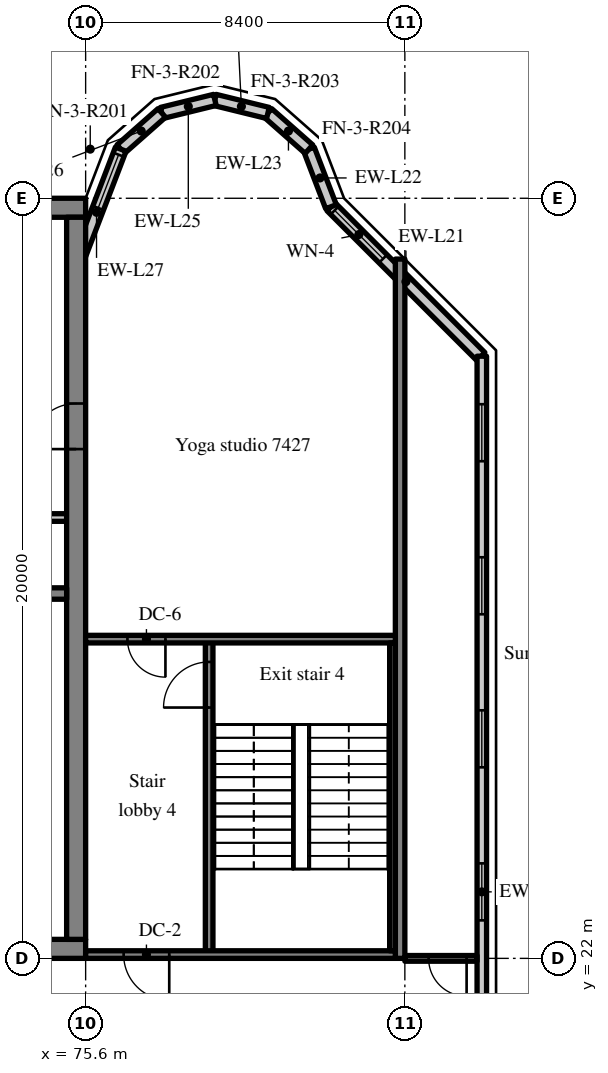
"""IFC4 building model, lengths in metres.
Left out: names, types, materials, properties, quantities, classifications, styles, units other than length and angle.
Written with IfcOpenShell. Run it as: python <this file> out.ifc"""

import sys

from ifc_helpers import new_model, si_unit, direction, frame, frame_2d, origin, place, context, subcontext, project, spatial, rectangle, extrude, source, transform, mapped, element, fill, save


model = new_model("IFC4")
c1 = context("Model", 3, precision=1e-05, world=origin(), true_north=direction((0.0, 1.0)))
c2 = subcontext(c1, "Body", "Model", "MODEL_VIEW")
j1 = project(units=[si_unit("LENGTHUNIT", "METRE"), si_unit("PLANEANGLEUNIT", "RADIAN")], contexts=[c1])
p1 = place(None, origin())
s1 = spatial("IfcSite", under=j1, at=p1, CompositionType="ELEMENT")
p2 = place(p1, origin())
s2 = spatial("IfcBuilding", under=s1, at=p2, CompositionType="ELEMENT")
p3 = place(p2, frame((0.0, 0.0, 309.7)))
s3 = spatial("IfcBuildingStorey", under=s2, at=p3, CompositionType="ELEMENT", Elevation=309.7)
m1 = source(origin(), c2, "Body", "SweptSolid", [
    extrude(rectangle(XDim=50.4, YDim=0.5, at=frame_2d((25.2, 0.0))), origin(), (0.0, 0.0, 1.0), 3.72),
])
p4 = place(p3, frame((25.2, 22.25, 0.0), z_axis=(0.0, 0.0, 1.0), x_axis=(1.0, 0.0, 0.0)))
e1 = element("IfcWall", 1, at=p4, inside=s3, PredefinedType="SHEAR", context=c2, shape_type="MappedRepresentation", body=[
    mapped(m1, transform((0.0, 0.0, 0.0), scale=1.0)),
])
m2 = source(origin(), c2, "Body", "SweptSolid", [
    extrude(rectangle(XDim=1.8, YDim=2.1, at=frame_2d((0.9, 1.05))), frame((0.0, 0.26, 0.0), z_axis=(0.0, -1.0, 0.0), x_axis=(1.0, 0.0, 0.0)), (0.0, 0.0, 1.0), 0.52),
])
p5 = place(p4, frame((15.9, 0.0, 0.0)))
e2 = element("IfcOpeningElement", 2, at=p5, cuts=e1, PredefinedType="OPENING", context=c2, shape_type="MappedRepresentation", body=[
    mapped(m2, transform((0.0, 0.0, 0.0), scale=1.0)),
])
m3 = source(origin(), c2, "Body", "SweptSolid", [
    extrude(rectangle(XDim=0.9, YDim=2.1, at=frame_2d((0.45, 1.05))), frame((0.0, 0.26, 0.0), z_axis=(0.0, -1.0, 0.0), x_axis=(1.0, 0.0, 0.0)), (0.0, 0.0, 1.0), 0.52),
])
p6 = place(p4, frame((11.175, 0.0, 0.0)))
e3 = element("IfcOpeningElement", 3, at=p6, cuts=e1, PredefinedType="OPENING", context=c2, shape_type="MappedRepresentation", body=[
    mapped(m3, transform((0.0, 0.0, 0.0), scale=1.0)),
])
p7 = place(p4, frame((21.525, 0.0, 0.0)))
e4 = element("IfcOpeningElement", 4, at=p7, cuts=e1, PredefinedType="OPENING", context=c2, shape_type="MappedRepresentation", body=[
    mapped(m3, transform((0.0, 0.0, 0.0), scale=1.0)),
])
p8 = place(p4, frame((32.7, 0.0, 0.0)))
e5 = element("IfcOpeningElement", 5, at=p8, cuts=e1, PredefinedType="OPENING", context=c2, shape_type="MappedRepresentation", body=[
    mapped(m2, transform((0.0, 0.0, 0.0), scale=1.0)),
])
m4 = source(origin(), c2, "Body", "SweptSolid", [
    extrude(rectangle(XDim=1.2, YDim=2.1, at=frame_2d((0.6, 1.05))), frame((0.0, 0.26, 0.0), z_axis=(0.0, -1.0, 0.0), x_axis=(1.0, 0.0, 0.0)), (0.0, 0.0, 1.0), 0.52),
])
p9 = place(p4, frame((6.5, 0.0, 0.0)))
e6 = element("IfcOpeningElement", 6, at=p9, cuts=e1, PredefinedType="OPENING", context=c2, shape_type="MappedRepresentation", body=[
    mapped(m4, transform((0.0, 0.0, 0.0), scale=1.0)),
])
p10 = place(p4, frame((47.975, 0.0, 0.0)))
e7 = element("IfcOpeningElement", 7, at=p10, cuts=e1, PredefinedType="OPENING", context=c2, shape_type="MappedRepresentation", body=[
    mapped(m4, transform((0.0, 0.0, 0.0), scale=1.0)),
])
p11 = place(p3, frame((25.2, 41.75, 0.0), z_axis=(0.0, 0.0, 1.0), x_axis=(1.0, 0.0, 0.0)))
e8 = element("IfcWall", 8, at=p11, inside=s3, PredefinedType="SHEAR", context=c2, shape_type="MappedRepresentation", body=[
    mapped(m1, transform((0.0, 0.0, 0.0), scale=1.0)),
])
m5 = source(origin(), c2, "Body", "SweptSolid", [
    extrude(rectangle(XDim=19.0, YDim=0.5, at=frame_2d((9.5, 0.0))), origin(), (0.0, 0.0, 1.0), 3.72),
])
p12 = place(p3, frame((75.35, 22.5, 0.0), z_axis=(0.0, 0.0, 1.0), x_axis=(0.0, 1.0, 0.0)))
e9 = element("IfcWall", 9, at=p12, inside=s3, PredefinedType="SHEAR", context=c2, shape_type="MappedRepresentation", body=[
    mapped(m5, transform((0.0, 0.0, 0.0), scale=1.0)),
])
p13 = place(p12, frame((12.9, 0.0, 0.0)))
e10 = element("IfcOpeningElement", 10, at=p13, cuts=e9, PredefinedType="OPENING", context=c2, shape_type="MappedRepresentation", body=[
    mapped(m4, transform((0.0, 0.0, 0.0), scale=1.0)),
])
m6 = source(origin(), c2, "Body", "SweptSolid", [
    extrude(rectangle(XDim=7.75, YDim=0.3, at=frame_2d((3.875, 0.0))), origin(), (0.0, 0.0, 1.0), 3.72),
])
p14 = place(p3, frame((67.35, 31.6, 0.0), z_axis=(0.0, 0.0, 1.0), x_axis=(1.0, 0.0, 0.0)))
e11 = element("IfcWall", 11, at=p14, inside=s3, PredefinedType="SHEAR", context=c2, shape_type="MappedRepresentation", body=[
    mapped(m6, transform((0.0, 0.0, 0.0), scale=1.0)),
])
m7 = source(origin(), c2, "Body", "SweptSolid", [
    extrude(rectangle(XDim=1.1, YDim=2.1, at=frame_2d((0.55, 1.05))), frame((0.0, 0.16, 0.0), z_axis=(0.0, -1.0, 0.0), x_axis=(1.0, 0.0, 0.0)), (0.0, 0.0, 1.0), 0.32),
])
p15 = place(p14, frame((5.875, 0.0, 0.0)))
e12 = element("IfcOpeningElement", 12, at=p15, cuts=e11, PredefinedType="OPENING", context=c2, shape_type="MappedRepresentation", body=[
    mapped(m7, transform((0.0, 0.0, 0.0), scale=1.0)),
])
m8 = source(origin(), c2, "Body", "SweptSolid", [
    extrude(rectangle(XDim=18.4, YDim=0.25, at=frame_2d((9.2, 0.0))), origin(), (0.0, 0.0, 1.0), 3.72),
])
p16 = place(p3, frame((83.875, 22.0, 0.0), z_axis=(0.0, 0.0, 1.0), x_axis=(0.0, 1.0, 0.0)))
e13 = element("IfcWall", 13, at=p16, inside=s3, PredefinedType="SHEAR", context=c2, shape_type="MappedRepresentation", body=[
    mapped(m8, transform((0.0, 0.0, 0.0), scale=1.0)),
])
m9 = source(origin(), c2, "Body", "SweptSolid", [
    extrude(rectangle(XDim=5.576, YDim=0.3, at=frame_2d((2.788, 0.0))), origin(), (0.0, 0.0, 1.0), 3.72),
])
p17 = place(p3, frame((86.0, 37.834, 0.0), z_axis=(0.0, 0.0, 1.0), x_axis=(-0.707106781187, 0.707106781187, 0.0)))
e14 = element("IfcWall", 14, at=p17, inside=s3, PredefinedType="SOLIDWALL", context=c2, shape_type="MappedRepresentation", body=[
    mapped(m9, transform((0.0, 0.0, 0.0), scale=1.0)),
])
m10 = source(origin(), c2, "Body", "SweptSolid", [
    extrude(rectangle(XDim=1.8, YDim=1.5, at=frame_2d((0.9, 0.75))), frame((0.0, 0.16, 0.0), z_axis=(0.0, -1.0, 0.0), x_axis=(1.0, 0.0, 0.0)), (0.0, 0.0, 1.0), 0.32),
])
p18 = place(p17, frame((3.641, 0.0, 0.9)))
e15 = element("IfcOpeningElement", 15, at=p18, cuts=e14, PredefinedType="OPENING", context=c2, shape_type="MappedRepresentation", body=[
    mapped(m10, transform((0.0, 0.0, 0.0), scale=1.0)),
])
m11 = source(origin(), c2, "Body", "SweptSolid", [
    extrude(rectangle(XDim=1.622, YDim=0.3, at=frame_2d((0.811, 0.0))), origin(), (0.0, 0.0, 1.0), 3.72),
])
p19 = place(p3, frame((82.057, 41.777, 0.0), z_axis=(0.0, 0.0, 1.0), x_axis=(-0.357778527068, 0.933806471154, 0.0)))
e16 = element("IfcWall", 16, at=p19, inside=s3, PredefinedType="SOLIDWALL", context=c2, shape_type="MappedRepresentation", body=[
    mapped(m11, transform((0.0, 0.0, 0.0), scale=1.0)),
])
m12 = source(origin(), c2, "Body", "SweptSolid", [
    extrude(rectangle(XDim=1.44, YDim=0.3, at=frame_2d((0.72, 0.0))), origin(), (0.0, 0.0, 1.0), 3.72),
])
p20 = place(p3, frame((81.477, 43.292, 0.0), z_axis=(0.0, 0.0, 1.0), x_axis=(-0.74957555648, 0.661918790432, 0.0)))
e17 = element("IfcWall", 17, at=p20, inside=s3, PredefinedType="SOLIDWALL", context=c2, shape_type="MappedRepresentation", body=[
    mapped(m12, transform((0.0, 0.0, 0.0), scale=1.0)),
])
m13 = source(origin(), c2, "Body", "SweptSolid", [
    extrude(rectangle(XDim=1.439, YDim=0.3, at=frame_2d((0.719, 0.0))), origin(), (0.0, 0.0, 1.0), 3.72),
])
for number, where, z_axis, x_axis in (
    (18, (80.397, 44.245, 0.0), (0.0, 0.0, 1.0), (-0.971, 0.238, 0.0)),
    (19, (79.0, 44.588, 0.0), (0.0, 0.0, 1.0), (-0.971, -0.238, 0.0)),
):
    element("IfcWall", number, at=place(p3, frame(where, z_axis=z_axis, x_axis=x_axis)), inside=s3, PredefinedType="SOLIDWALL", context=c2, shape_type="MappedRepresentation", body=[
        mapped(m13, transform((0.0, 0.0, 0.0), scale=1.0)),
    ])
p21 = place(p3, frame((77.603, 44.245, 0.0), z_axis=(0.0, 0.0, 1.0), x_axis=(-0.74957555648, -0.661918790432, 0.0)))
e20 = element("IfcWall", 20, at=p21, inside=s3, PredefinedType="SOLIDWALL", context=c2, shape_type="MappedRepresentation", body=[
    mapped(m12, transform((0.0, 0.0, 0.0), scale=1.0)),
])
m14 = source(origin(), c2, "Body", "SweptSolid", [
    extrude(rectangle(XDim=3.559, YDim=0.3, at=frame_2d((1.78, 0.0))), origin(), (0.0, 0.0, 1.0), 3.72),
])
p22 = place(p3, frame((76.523, 43.292, 0.0), z_axis=(0.0, 0.0, 1.0), x_axis=(-0.35779745313, -0.933799219604, 0.0)))
e21 = element("IfcWall", 21, at=p22, inside=s3, PredefinedType="SOLIDWALL", context=c2, shape_type="MappedRepresentation", body=[
    mapped(m14, transform((0.0, 0.0, 0.0), scale=1.0)),
])
m15 = source(origin(), c2, "Body", "SweptSolid", [
    extrude(rectangle(XDim=1.5, YDim=2.0, at=frame_2d((0.75, 1.0))), frame((0.0, 0.16, 0.0), z_axis=(0.0, -1.0, 0.0), x_axis=(1.0, 0.0, 0.0)), (0.0, 0.0, 1.0), 0.32),
])
p23 = place(p22, frame((0.156, 0.0, 0.9)))
e22 = element("IfcOpeningElement", 22, at=p23, cuts=e21, PredefinedType="OPENING", context=c2, shape_type="MappedRepresentation", body=[
    mapped(m15, transform((0.0, 0.0, 0.0), scale=1.0)),
])
m16 = source(origin(), c2, "Body", "SweptSolid", [
    extrude(rectangle(XDim=28.189, YDim=0.25, at=frame_2d((14.095, 0.0))), origin(), (0.0, 0.0, 1.0), 3.72),
])
p24 = place(p3, frame((86.025, 9.655, 0.0), z_axis=(0.0, 0.0, 1.0), x_axis=(0.0, 1.0, 0.0)))
e23 = element("IfcWall", 23, at=p24, inside=s3, PredefinedType="SOLIDWALL", context=c2, shape_type="MappedRepresentation", body=[
    mapped(m16, transform((0.0, 0.0, 0.0), scale=1.0)),
])
m17 = source(origin(), c2, "Body", "SweptSolid", [
    extrude(rectangle(XDim=1.5, YDim=1.5, at=frame_2d((0.75, 0.75))), frame((0.0, 0.135, 0.0), z_axis=(0.0, -1.0, 0.0), x_axis=(1.0, 0.0, 0.0)), (0.0, 0.0, 1.0), 0.27),
])
p25 = place(p24, frame((1.263, 0.0, 0.9)))
e24 = element("IfcOpeningElement", 24, at=p25, cuts=e23, PredefinedType="OPENING", context=c2, shape_type="MappedRepresentation", body=[
    mapped(m17, transform((0.0, 0.0, 0.0), scale=1.0)),
])
p26 = place(p24, frame((5.291, 0.0, 0.9)))
e25 = element("IfcOpeningElement", 25, at=p26, cuts=e23, PredefinedType="OPENING", context=c2, shape_type="MappedRepresentation", body=[
    mapped(m17, transform((0.0, 0.0, 0.0), scale=1.0)),
])
p27 = place(p24, frame((9.318, 0.0, 0.9)))
e26 = element("IfcOpeningElement", 26, at=p27, cuts=e23, PredefinedType="OPENING", context=c2, shape_type="MappedRepresentation", body=[
    mapped(m17, transform((0.0, 0.0, 0.0), scale=1.0)),
])
p28 = place(p24, frame((13.345, 0.0, 0.9)))
e27 = element("IfcOpeningElement", 27, at=p28, cuts=e23, PredefinedType="OPENING", context=c2, shape_type="MappedRepresentation", body=[
    mapped(m17, transform((0.0, 0.0, 0.0), scale=1.0)),
])
p29 = place(p24, frame((17.372, 0.0, 0.9)))
e28 = element("IfcOpeningElement", 28, at=p29, cuts=e23, PredefinedType="OPENING", context=c2, shape_type="MappedRepresentation", body=[
    mapped(m17, transform((0.0, 0.0, 0.0), scale=1.0)),
])
p30 = place(p24, frame((21.399, 0.0, 0.9)))
e29 = element("IfcOpeningElement", 29, at=p30, cuts=e23, PredefinedType="OPENING", context=c2, shape_type="MappedRepresentation", body=[
    mapped(m17, transform((0.0, 0.0, 0.0), scale=1.0)),
])
p31 = place(p24, frame((25.426, 0.0, 0.9)))
e30 = element("IfcOpeningElement", 30, at=p31, cuts=e23, PredefinedType="OPENING", context=c2, shape_type="MappedRepresentation", body=[
    mapped(m17, transform((0.0, 0.0, 0.0), scale=1.0)),
])
m18 = source(origin(), c2, "Body", "SweptSolid", [
    extrude(rectangle(XDim=2.65, YDim=0.2, at=frame_2d((1.325, 0.0))), origin(), (0.0, 0.0, 1.0), 3.72),
])
p32 = place(p3, frame((72.45, 33.6, 0.0), z_axis=(0.0, 0.0, 1.0), x_axis=(1.0, 0.0, 0.0)))
e31 = element("IfcWall", 31, at=p32, inside=s3, PredefinedType="SOLIDWALL", context=c2, shape_type="MappedRepresentation", body=[
    mapped(m18, transform((0.0, 0.0, 0.0), scale=1.0)),
])
m19 = source(origin(), c2, "Body", "SweptSolid", [
    extrude(rectangle(XDim=8.3, YDim=0.2, at=frame_2d((4.15, 0.0))), origin(), (0.0, 0.0, 1.0), 3.72),
])
p33 = place(p3, frame((78.85, 22.1, 0.0), z_axis=(0.0, 0.0, 1.0), x_axis=(0.0, 1.0, 0.0)))
e32 = element("IfcWall", 32, at=p33, inside=s3, PredefinedType="SOLIDWALL", context=c2, shape_type="MappedRepresentation", body=[
    mapped(m19, transform((0.0, 0.0, 0.0), scale=1.0)),
])
m20 = source(origin(), c2, "Body", "SweptSolid", [
    extrude(rectangle(XDim=1.2, YDim=2.1, at=frame_2d((0.6, 1.05))), frame((0.0, 0.11, 0.0), z_axis=(0.0, -1.0, 0.0), x_axis=(1.0, 0.0, 0.0)), (0.0, 0.0, 1.0), 0.22),
])
p34 = place(p33, frame((6.5, 0.0, 0.0)))
e33 = element("IfcOpeningElement", 33, at=p34, cuts=e32, PredefinedType="OPENING", context=c2, shape_type="MappedRepresentation", body=[
    mapped(m20, transform((0.0, 0.0, 0.0), scale=1.0)),
])
m21 = source(origin(), c2, "Body", "SweptSolid", [
    extrude(rectangle(XDim=8.15, YDim=0.2, at=frame_2d((4.075, 0.0))), origin(), (0.0, 0.0, 1.0), 3.72),
])
p35 = place(p3, frame((83.75, 22.1, 0.0), z_axis=(0.0, 0.0, 1.0), x_axis=(-1.0, 0.0, 0.0)))
e34 = element("IfcWall", 34, at=p35, inside=s3, PredefinedType="SOLIDWALL", context=c2, shape_type="MappedRepresentation", body=[
    mapped(m21, transform((0.0, 0.0, 0.0), scale=1.0)),
])
p36 = place(p35, frame((5.95, 0.0, 0.0)))
e35 = element("IfcOpeningElement", 35, at=p36, cuts=e34, PredefinedType="OPENING", context=c2, shape_type="MappedRepresentation", body=[
    mapped(m20, transform((0.0, 0.0, 0.0), scale=1.0)),
])
p37 = place(p3, frame((83.75, 30.4, 0.0), z_axis=(0.0, 0.0, 1.0), x_axis=(-1.0, 0.0, 0.0)))
e36 = element("IfcWall", 36, at=p37, inside=s3, PredefinedType="SOLIDWALL", context=c2, shape_type="MappedRepresentation", body=[
    mapped(m21, transform((0.0, 0.0, 0.0), scale=1.0)),
])
m22 = source(origin(), c2, "Body", "SweptSolid", [
    extrude(rectangle(XDim=1.0, YDim=2.1, at=frame_2d((0.5, 1.05))), frame((0.0, 0.11, 0.0), z_axis=(0.0, -1.0, 0.0), x_axis=(1.0, 0.0, 0.0)), (0.0, 0.0, 1.0), 0.22),
])
p38 = place(p37, frame((6.05, 0.0, 0.0)))
e37 = element("IfcOpeningElement", 37, at=p38, cuts=e36, PredefinedType="OPENING", context=c2, shape_type="MappedRepresentation", body=[
    mapped(m22, transform((0.0, 0.0, 0.0), scale=1.0)),
])
m23 = source(origin(), c2, "Body", "SweptSolid", [
    extrude(rectangle(XDim=8.1, YDim=0.15, at=frame_2d((4.05, 0.0))), origin(), (0.0, 0.0, 1.0), 3.72),
])
p39 = place(p3, frame((83.675, 22.2, 0.0), z_axis=(0.0, 0.0, 1.0), x_axis=(0.0, 1.0, 0.0)))
e38 = element("IfcWall", 38, at=p39, inside=s3, PredefinedType="SOLIDWALL", context=c2, shape_type="MappedRepresentation", body=[
    mapped(m23, transform((0.0, 0.0, 0.0), scale=1.0)),
])
m24 = source(origin(), c2, "Body", "SweptSolid", [
    extrude(rectangle(XDim=1.9, YDim=0.15, at=frame_2d((0.95, 0.0))), origin(), (0.0, 0.0, 1.0), 3.02),
])
p40 = place(p3, frame((84.0, 22.0, 0.0), z_axis=(0.0, 0.0, 1.0), x_axis=(1.0, 0.0, 0.0)))
e39 = element("IfcWall", 39, at=p40, inside=s3, PredefinedType="PARTITIONING", context=c2, shape_type="MappedRepresentation", body=[
    mapped(m24, transform((0.0, 0.0, 0.0), scale=1.0)),
])
m25 = source(origin(), c2, "Body", "SweptSolid", [
    extrude(rectangle(XDim=1.0, YDim=2.1, at=frame_2d((0.5, 1.05))), frame((0.0, 0.085, 0.0), z_axis=(0.0, -1.0, 0.0), x_axis=(1.0, 0.0, 0.0)), (0.0, 0.0, 1.0), 0.17),
])
p41 = place(p40, frame((0.625, 0.0, 0.0)))
e40 = element("IfcOpeningElement", 40, at=p41, cuts=e39, PredefinedType="OPENING", context=c2, shape_type="MappedRepresentation", body=[
    mapped(m25, transform((0.0, 0.0, 0.0), scale=1.0)),
])
m26 = source(origin(), c2, "Body", "SweptSolid", [
    extrude(rectangle(XDim=1.8, YDim=1.5, at=frame_2d((0.9, 0.75))), frame((0.0, 0.03, 0.0), z_axis=(0.0, -1.0, 0.0), x_axis=(1.0, 0.0, 0.0)), (0.0, 0.0, 1.0), 0.06),
])
p42 = place(p18, origin())
e41 = element("IfcWindow", 41, at=p42, inside=s3, PartitioningType="SINGLE_PANEL", PredefinedType="WINDOW", context=c2, shape_type="MappedRepresentation", body=[
    mapped(m26, transform((0.0, 0.0, 0.0), scale=1.0)),
])
fill(e15, e41)
m27 = source(origin(), c2, "Body", "SweptSolid", [
    extrude(rectangle(XDim=1.5, YDim=2.0, at=frame_2d((0.75, 1.0))), frame((0.0, 0.03, 0.0), z_axis=(0.0, -1.0, 0.0), x_axis=(1.0, 0.0, 0.0)), (0.0, 0.0, 1.0), 0.06),
])
p43 = place(p23, origin())
e42 = element("IfcWindow", 42, at=p43, inside=s3, PartitioningType="SINGLE_PANEL", PredefinedType="WINDOW", context=c2, shape_type="MappedRepresentation", body=[
    mapped(m27, transform((0.0, 0.0, 0.0), scale=1.0)),
])
fill(e22, e42)
m28 = source(origin(), c2, "Body", "SweptSolid", [
    extrude(rectangle(XDim=1.5, YDim=1.5, at=frame_2d((0.75, 0.75))), frame((0.0, 0.03, 0.0), z_axis=(0.0, -1.0, 0.0), x_axis=(1.0, 0.0, 0.0)), (0.0, 0.0, 1.0), 0.06),
])
p44 = place(p28, origin())
e43 = element("IfcWindow", 43, at=p44, inside=s3, PartitioningType="SINGLE_PANEL", PredefinedType="WINDOW", context=c2, shape_type="MappedRepresentation", body=[
    mapped(m28, transform((0.0, 0.0, 0.0), scale=1.0)),
])
fill(e27, e43)
p45 = place(p29, origin())
e44 = element("IfcWindow", 44, at=p45, inside=s3, PartitioningType="SINGLE_PANEL", PredefinedType="WINDOW", context=c2, shape_type="MappedRepresentation", body=[
    mapped(m28, transform((0.0, 0.0, 0.0), scale=1.0)),
])
fill(e28, e44)
p46 = place(p30, origin())
e45 = element("IfcWindow", 45, at=p46, inside=s3, PartitioningType="SINGLE_PANEL", PredefinedType="WINDOW", context=c2, shape_type="MappedRepresentation", body=[
    mapped(m28, transform((0.0, 0.0, 0.0), scale=1.0)),
])
fill(e29, e45)
p47 = place(p31, origin())
e46 = element("IfcWindow", 46, at=p47, inside=s3, PartitioningType="SINGLE_PANEL", PredefinedType="WINDOW", context=c2, shape_type="MappedRepresentation", body=[
    mapped(m28, transform((0.0, 0.0, 0.0), scale=1.0)),
])
fill(e30, e46)
m29 = source(origin(), c2, "Body", "SweptSolid", [
    extrude(rectangle(XDim=1.2, YDim=2.1, at=frame_2d((0.6, 1.05))), frame((0.0, 0.025, 0.0), z_axis=(0.0, -1.0, 0.0), x_axis=(1.0, 0.0, 0.0)), (0.0, 0.0, 1.0), 0.05),
])
p48 = place(p13, origin())
e47 = element("IfcDoor", 47, at=p48, inside=s3, OperationType="SINGLE_SWING_LEFT", PredefinedType="DOOR", context=c2, shape_type="MappedRepresentation", body=[
    mapped(m29, transform((0.0, 0.0, 0.0), scale=1.0)),
])
fill(e10, e47)
p49 = place(p34, origin())
e48 = element("IfcDoor", 48, at=p49, inside=s3, OperationType="SINGLE_SWING_LEFT", PredefinedType="DOOR", context=c2, shape_type="MappedRepresentation", body=[
    mapped(m29, transform((0.0, 0.0, 0.0), scale=1.0)),
])
fill(e33, e48)
p50 = place(p36, origin())
e49 = element("IfcDoor", 49, at=p50, inside=s3, OperationType="SINGLE_SWING_LEFT", PredefinedType="DOOR", context=c2, shape_type="MappedRepresentation", body=[
    mapped(m29, transform((0.0, 0.0, 0.0), scale=1.0)),
])
fill(e35, e49)
m30 = source(origin(), c2, "Body", "SweptSolid", [
    extrude(rectangle(XDim=1.0, YDim=2.1, at=frame_2d((0.5, 1.05))), frame((0.0, 0.025, 0.0), z_axis=(0.0, -1.0, 0.0), x_axis=(1.0, 0.0, 0.0)), (0.0, 0.0, 1.0), 0.05),
])
p51 = place(p38, origin())
e50 = element("IfcDoor", 50, at=p51, inside=s3, OperationType="SINGLE_SWING_LEFT", PredefinedType="DOOR", context=c2, shape_type="MappedRepresentation", body=[
    mapped(m30, transform((0.0, 0.0, 0.0), scale=1.0)),
])
fill(e37, e50)
p52 = place(p41, origin())
e51 = element("IfcDoor", 51, at=p52, inside=s3, OperationType="SINGLE_SWING_RIGHT", PredefinedType="DOOR", context=c2, shape_type="MappedRepresentation", body=[
    mapped(m30, transform((0.0, 0.0, 0.0), scale=1.0)),
])
fill(e40, e51)
save(model, sys.argv[1])
